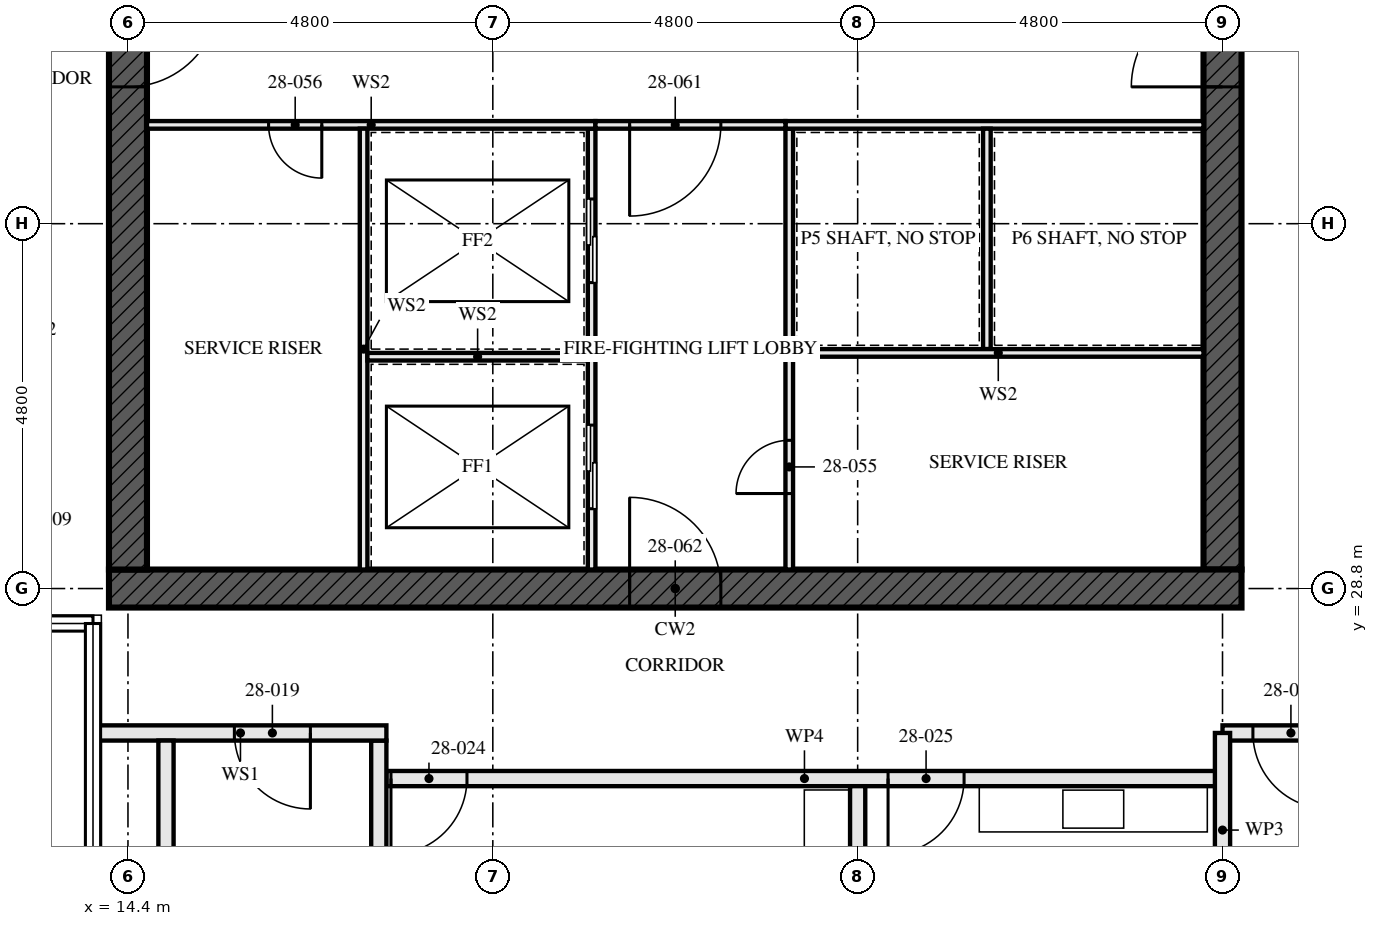
"""IFC4 building model, lengths in metres.
Left out: names, types, materials, properties, quantities, classifications, styles, units other than length and angle.
Written with IfcOpenShell. Run it as: python <this file> out.ifc"""

import sys

from ifc_helpers import new_model, si_unit, direction, frame, frame_2d, origin, place, context, subcontext, project, spatial, rectangle, extrude, element, fill, save


model = new_model("IFC4")
c1 = context("Model", 3, precision=1e-05, world=origin(), true_north=direction((0.0, 1.0)))
c2 = subcontext(c1, "Body", "Model", "MODEL_VIEW")
j1 = project(units=[si_unit("LENGTHUNIT", "METRE"), si_unit("PLANEANGLEUNIT", "RADIAN")], contexts=[c1])
p1 = place(None, origin())
s1 = spatial("IfcSite", under=j1, at=p1, CompositionType="ELEMENT")
p2 = place(p1, origin())
s2 = spatial("IfcBuilding", under=s1, at=p2, CompositionType="ELEMENT")
p3 = place(p2, frame((0.0, 0.0, 105.0)))
s3 = spatial("IfcBuildingStorey", under=s2, at=p3, CompositionType="ELEMENT", Elevation=105.0)
p4 = place(p3, frame((14.15, 28.8, -0.17), z_axis=(0.0, 0.0, 1.0), x_axis=(1.0, 0.0, 0.0)))
e1 = element("IfcWall", 1, at=p4, inside=s3, PredefinedType="SHEAR", context=c2, shape_type="SweptSolid", body=[
    extrude(rectangle(XDim=14.9, YDim=0.5, at=frame_2d((7.45, 0.0))), origin(), (0.0, 0.0, 1.0), 3.5),
])
p5 = place(p4, frame((6.85, 0.0, 0.17)))
e2 = element("IfcOpeningElement", 2, at=p5, cuts=e1, PredefinedType="OPENING", context=c2, shape_type="SweptSolid", body=[
    extrude(rectangle(XDim=1.2, YDim=2.1, at=frame_2d((0.6, 1.05))), frame((0.0, 0.26, 0.0), z_axis=(0.0, -1.0, 0.0), x_axis=(1.0, 0.0, 0.0)), (0.0, 0.0, 1.0), 0.521),
])
p6 = place(p3, frame((14.4, 42.95, -0.17), z_axis=(0.0, 0.0, 1.0), x_axis=(0.0, -1.0, 0.0)))
e3 = element("IfcWall", 3, at=p6, inside=s3, PredefinedType="SHEAR", context=c2, shape_type="SweptSolid", body=[
    extrude(rectangle(XDim=13.9, YDim=0.5, at=frame_2d((6.95, 0.0))), origin(), (0.0, 0.0, 1.0), 3.5),
])
p7 = place(p6, frame((6.35, 0.0, 0.17)))
e4 = element("IfcOpeningElement", 4, at=p7, cuts=e3, PredefinedType="OPENING", context=c2, shape_type="SweptSolid", body=[
    extrude(rectangle(XDim=1.2, YDim=2.1, at=frame_2d((0.6, 1.05))), frame((0.0, 0.26, 0.0), z_axis=(0.0, -1.0, 0.0), x_axis=(1.0, 0.0, 0.0)), (0.0, 0.0, 1.0), 0.521),
])
p8 = place(p3, frame((28.8, 29.05, -0.17), z_axis=(0.0, 0.0, 1.0), x_axis=(0.0, 1.0, 0.0)))
e5 = element("IfcWall", 5, at=p8, inside=s3, PredefinedType="SHEAR", context=c2, shape_type="SweptSolid", body=[
    extrude(rectangle(XDim=13.9, YDim=0.5, at=frame_2d((6.95, 0.0))), origin(), (0.0, 0.0, 1.0), 3.5),
])
p9 = place(p8, frame((6.35, 0.0, 0.17)))
e6 = element("IfcOpeningElement", 6, at=p9, cuts=e5, PredefinedType="OPENING", context=c2, shape_type="SweptSolid", body=[
    extrude(rectangle(XDim=1.2, YDim=2.1, at=frame_2d((0.6, 1.05))), frame((0.0, 0.26, 0.0), z_axis=(0.0, -1.0, 0.0), x_axis=(1.0, 0.0, 0.0)), (0.0, 0.0, 1.0), 0.521),
])
for number, where, z_axis, x_axis in (
    (7, (14.9, 22.1, 0.0), (0.0, 0.0, 1.0), (0.0, 1.0, 0.0)),
    (8, (17.7, 22.1, 0.0), (0.0, 0.0, 1.0), (0.0, 1.0, 0.0)),
):
    element("IfcWall", number, at=place(p3, frame(where, z_axis=z_axis, x_axis=x_axis)), inside=s3, PredefinedType="SOLIDWALL", context=c2, shape_type="SweptSolid", body=[
        extrude(rectangle(XDim=4.7, YDim=0.2, at=frame_2d((2.35, 0.0))), origin(), (0.0, 0.0, 1.0), 2.99),
    ])
p10 = place(p3, frame((13.96, 26.9, 0.0), z_axis=(0.0, 0.0, 1.0), x_axis=(1.0, 0.0, 0.0)))
e9 = element("IfcWall", 9, at=p10, inside=s3, PredefinedType="SOLIDWALL", context=c2, shape_type="SweptSolid", body=[
    extrude(rectangle(XDim=3.84, YDim=0.2, at=frame_2d((1.92, 0.0))), origin(), (0.0, 0.0, 1.0), 2.32),
])
p11 = place(p10, frame((1.84, 0.0, 0.0)))
e10 = element("IfcOpeningElement", 10, at=p11, cuts=e9, PredefinedType="OPENING", context=c2, shape_type="SweptSolid", body=[
    extrude(rectangle(XDim=1.0, YDim=2.1, at=frame_2d((0.5, 1.05))), frame((0.0, 0.111, 0.0), z_axis=(0.0, -1.0, 0.0), x_axis=(1.0, 0.0, 0.0)), (0.0, 0.0, 1.0), 0.221),
])
p12 = place(p3, frame((24.0, 14.745, 0.0), z_axis=(0.0, 0.0, 1.0), x_axis=(0.0, 1.0, 0.0)))
e11 = element("IfcWall", 11, at=p12, inside=s3, PredefinedType="PARTITIONING", context=c2, shape_type="SweptSolid", body=[
    extrude(rectangle(XDim=11.455, YDim=0.2, at=frame_2d((5.728, 0.0))), origin(), (0.0, 0.0, 1.0), 2.55),
])
p13 = place(p3, frame((17.8, 26.3, 0.0), z_axis=(0.0, 0.0, 1.0), x_axis=(1.0, 0.0, 0.0)))
e12 = element("IfcWall", 12, at=p13, inside=s3, PredefinedType="PARTITIONING", context=c2, shape_type="SweptSolid", body=[
    extrude(rectangle(XDim=11.0, YDim=0.2, at=frame_2d((5.5, 0.0))), origin(), (0.0, 0.0, 1.0), 2.55),
])
p14 = place(p13, frame((0.06, 0.0, 0.0)))
e13 = element("IfcOpeningElement", 13, at=p14, cuts=e12, PredefinedType="OPENING", context=c2, shape_type="SweptSolid", body=[
    extrude(rectangle(XDim=1.0, YDim=2.1, at=frame_2d((0.5, 1.05))), frame((0.0, 0.111, 0.0), z_axis=(0.0, -1.0, 0.0), x_axis=(1.0, 0.0, 0.0)), (0.0, 0.0, 1.0), 0.221),
])
p15 = place(p13, frame((6.6, 0.0, 0.0)))
e14 = element("IfcOpeningElement", 14, at=p15, cuts=e12, PredefinedType="OPENING", context=c2, shape_type="SweptSolid", body=[
    extrude(rectangle(XDim=1.0, YDim=2.1, at=frame_2d((0.5, 1.05))), frame((0.0, 0.111, 0.0), z_axis=(0.0, -1.0, 0.0), x_axis=(1.0, 0.0, 0.0)), (0.0, 0.0, 1.0), 0.221),
])
p16 = place(p3, frame((28.8, 26.9, 0.0), z_axis=(0.0, 0.0, 1.0), x_axis=(1.0, 0.0, 0.0)))
e15 = element("IfcWall", 15, at=p16, inside=s3, PredefinedType="PARTITIONING", context=c2, shape_type="SweptSolid", body=[
    extrude(rectangle(XDim=9.6, YDim=0.2, at=frame_2d((4.8, 0.0))), origin(), (0.0, 0.0, 1.0), 3.33),
])
p17 = place(p16, frame((0.4, 0.0, 0.0)))
e16 = element("IfcOpeningElement", 16, at=p17, cuts=e15, PredefinedType="OPENING", context=c2, shape_type="SweptSolid", body=[
    extrude(rectangle(XDim=1.0, YDim=2.1, at=frame_2d((0.5, 1.05))), frame((0.0, 0.111, 0.0), z_axis=(0.0, -1.0, 0.0), x_axis=(1.0, 0.0, 0.0)), (0.0, 0.0, 1.0), 0.221),
])
p18 = place(p16, frame((5.2, 0.0, 0.0)))
e17 = element("IfcOpeningElement", 17, at=p18, cuts=e15, PredefinedType="OPENING", context=c2, shape_type="SweptSolid", body=[
    extrude(rectangle(XDim=1.0, YDim=2.1, at=frame_2d((0.5, 1.05))), frame((0.0, 0.111, 0.0), z_axis=(0.0, -1.0, 0.0), x_axis=(1.0, 0.0, 0.0)), (0.0, 0.0, 1.0), 0.221),
])
p19 = place(p3, frame((20.5, 29.05, 0.0), z_axis=(0.0, 0.0, 1.0), x_axis=(0.0, 1.0, 0.0)))
e18 = element("IfcWall", 18, at=p19, inside=s3, PredefinedType="SOLIDWALL", context=c2, shape_type="SweptSolid", body=[
    extrude(rectangle(XDim=5.8, YDim=0.1, at=frame_2d((2.9, 0.0))), origin(), (0.0, 0.0, 1.0), 3.33),
])
p20 = place(p19, frame((0.8, 0.0, 0.0)))
e19 = element("IfcOpeningElement", 19, at=p20, cuts=e18, PredefinedType="OPENING", context=c2, shape_type="SweptSolid", body=[
    extrude(rectangle(XDim=1.1, YDim=2.3, at=frame_2d((0.55, 1.15))), frame((0.0, 0.061, 0.0), z_axis=(0.0, -1.0, 0.0), x_axis=(1.0, 0.0, 0.0)), (0.0, 0.0, 1.0), 0.121),
])
p21 = place(p19, frame((3.775, 0.0, 0.0)))
e20 = element("IfcOpeningElement", 20, at=p21, cuts=e18, PredefinedType="OPENING", context=c2, shape_type="SweptSolid", body=[
    extrude(rectangle(XDim=1.1, YDim=2.3, at=frame_2d((0.55, 1.15))), frame((0.0, 0.061, 0.0), z_axis=(0.0, -1.0, 0.0), x_axis=(1.0, 0.0, 0.0)), (0.0, 0.0, 1.0), 0.121),
])
p22 = place(p3, frame((23.1, 29.05, 0.0), z_axis=(0.0, 0.0, 1.0), x_axis=(0.0, 1.0, 0.0)))
e21 = element("IfcWall", 21, at=p22, inside=s3, PredefinedType="SOLIDWALL", context=c2, shape_type="SweptSolid", body=[
    extrude(rectangle(XDim=5.8, YDim=0.1, at=frame_2d((2.9, 0.0))), origin(), (0.0, 0.0, 1.0), 3.33),
])
p23 = place(p22, frame((1.0, 0.0, 0.0)))
e22 = element("IfcOpeningElement", 22, at=p23, cuts=e21, PredefinedType="OPENING", context=c2, shape_type="SweptSolid", body=[
    extrude(rectangle(XDim=0.7, YDim=2.1, at=frame_2d((0.35, 1.05))), frame((0.0, 0.061, 0.0), z_axis=(0.0, -1.0, 0.0), x_axis=(1.0, 0.0, 0.0)), (0.0, 0.0, 1.0), 0.121),
])
p24 = place(p3, frame((14.65, 34.9, 0.0), z_axis=(0.0, 0.0, 1.0), x_axis=(1.0, 0.0, 0.0)))
e23 = element("IfcWall", 23, at=p24, inside=s3, PredefinedType="SOLIDWALL", context=c2, shape_type="SweptSolid", body=[
    extrude(rectangle(XDim=5.9, YDim=0.1, at=frame_2d((2.95, 0.0))), origin(), (0.0, 0.0, 1.0), 3.33),
])
p25 = place(p24, frame((1.6, 0.0, 0.0)))
e24 = element("IfcOpeningElement", 24, at=p25, cuts=e23, PredefinedType="OPENING", context=c2, shape_type="SweptSolid", body=[
    extrude(rectangle(XDim=0.7, YDim=2.1, at=frame_2d((0.35, 1.05))), frame((0.0, 0.061, 0.0), z_axis=(0.0, -1.0, 0.0), x_axis=(1.0, 0.0, 0.0)), (0.0, 0.0, 1.0), 0.121),
])
p26 = place(p3, frame((23.05, 34.9, 0.0), z_axis=(0.0, 0.0, 1.0), x_axis=(1.0, 0.0, 0.0)))
e25 = element("IfcWall", 25, at=p26, inside=s3, PredefinedType="SOLIDWALL", context=c2, shape_type="SweptSolid", body=[
    extrude(rectangle(XDim=5.5, YDim=0.1, at=frame_2d((2.75, 0.0))), origin(), (0.0, 0.0, 1.0), 3.33),
])
p27 = place(p3, frame((20.55, 34.9, 0.0), z_axis=(0.0, 0.0, 1.0), x_axis=(1.0, 0.0, 0.0)))
e26 = element("IfcWall", 26, at=p27, inside=s3, PredefinedType="SOLIDWALL", context=c2, shape_type="SweptSolid", body=[
    extrude(rectangle(XDim=2.5, YDim=0.1, at=frame_2d((1.25, 0.0))), origin(), (0.0, 0.0, 1.0), 3.33),
])
p28 = place(p27, frame((0.45, 0.0, 0.0)))
e27 = element("IfcOpeningElement", 27, at=p28, cuts=e26, PredefinedType="OPENING", context=c2, shape_type="SweptSolid", body=[
    extrude(rectangle(XDim=1.2, YDim=2.1, at=frame_2d((0.6, 1.05))), frame((0.0, 0.061, 0.0), z_axis=(0.0, -1.0, 0.0), x_axis=(1.0, 0.0, 0.0)), (0.0, 0.0, 1.0), 0.121),
])
p29 = place(p3, frame((17.5, 29.05, 0.0), z_axis=(0.0, 0.0, 1.0), x_axis=(0.0, 1.0, 0.0)))
e28 = element("IfcWall", 28, at=p29, inside=s3, PredefinedType="SOLIDWALL", context=c2, shape_type="SweptSolid", body=[
    extrude(rectangle(XDim=5.8, YDim=0.1, at=frame_2d((2.9, 0.0))), origin(), (0.0, 0.0, 1.0), 3.33),
])
p30 = place(p3, frame((17.55, 31.85, 0.0), z_axis=(0.0, 0.0, 1.0), x_axis=(1.0, 0.0, 0.0)))
e29 = element("IfcWall", 29, at=p30, inside=s3, PredefinedType="SOLIDWALL", context=c2, shape_type="SweptSolid", body=[
    extrude(rectangle(XDim=2.9, YDim=0.1, at=frame_2d((1.45, 0.0))), origin(), (0.0, 0.0, 1.0), 3.33),
])
p31 = place(p3, frame((25.7, 31.95, 0.0), z_axis=(0.0, 0.0, 1.0), x_axis=(0.0, 1.0, 0.0)))
e30 = element("IfcWall", 30, at=p31, inside=s3, PredefinedType="SOLIDWALL", context=c2, shape_type="SweptSolid", body=[
    extrude(rectangle(XDim=2.9, YDim=0.1, at=frame_2d((1.45, 0.0))), origin(), (0.0, 0.0, 1.0), 3.33),
])
p32 = place(p3, frame((23.15, 31.9, 0.0), z_axis=(0.0, 0.0, 1.0), x_axis=(1.0, 0.0, 0.0)))
e31 = element("IfcWall", 31, at=p32, inside=s3, PredefinedType="SOLIDWALL", context=c2, shape_type="SweptSolid", body=[
    extrude(rectangle(XDim=5.4, YDim=0.1, at=frame_2d((2.7, 0.0))), origin(), (0.0, 0.0, 1.0), 3.33),
])
p33 = place(p3, frame((28.8, 24.345, 0.0), z_axis=(0.0, 0.0, 1.0), x_axis=(0.0, 1.0, 0.0)))
e32 = element("IfcWall", 32, at=p33, inside=s3, PredefinedType="PARTITIONING", context=c2, shape_type="SweptSolid", body=[
    extrude(rectangle(XDim=2.555, YDim=0.2, at=frame_2d((1.277, 0.0))), origin(), (0.0, 0.0, 1.0), 2.32),
])
p34 = place(p11, frame((1.0, 0.0, 0.0), z_axis=(0.0, 0.0, 1.0), x_axis=(-1.0, 0.0, 0.0)))
e33 = element("IfcDoor", 33, at=p34, inside=s3, OperationType="SINGLE_SWING_RIGHT", PredefinedType="DOOR", context=c2, shape_type="SweptSolid", body=[
    extrude(rectangle(XDim=1.0, YDim=2.1, at=frame_2d((0.5, 1.05))), frame((0.0, 0.032, 0.0), z_axis=(0.0, -1.0, 0.0), x_axis=(1.0, 0.0, 0.0)), (0.0, 0.0, 1.0), 0.064),
])
fill(e10, e33)
p35 = place(p14, frame((1.0, 0.0, 0.0), z_axis=(0.0, 0.0, 1.0), x_axis=(-1.0, 0.0, 0.0)))
e34 = element("IfcDoor", 34, at=p35, inside=s3, OperationType="SINGLE_SWING_LEFT", PredefinedType="DOOR", context=c2, shape_type="SweptSolid", body=[
    extrude(rectangle(XDim=1.0, YDim=2.1, at=frame_2d((0.5, 1.05))), frame((0.0, 0.027, 0.0), z_axis=(0.0, -1.0, 0.0), x_axis=(1.0, 0.0, 0.0)), (0.0, 0.0, 1.0), 0.054),
])
fill(e13, e34)
p36 = place(p15, frame((1.0, 0.0, 0.0), z_axis=(0.0, 0.0, 1.0), x_axis=(-1.0, 0.0, 0.0)))
e35 = element("IfcDoor", 35, at=p36, inside=s3, OperationType="SINGLE_SWING_LEFT", PredefinedType="DOOR", context=c2, shape_type="SweptSolid", body=[
    extrude(rectangle(XDim=1.0, YDim=2.1, at=frame_2d((0.5, 1.05))), frame((0.0, 0.027, 0.0), z_axis=(0.0, -1.0, 0.0), x_axis=(1.0, 0.0, 0.0)), (0.0, 0.0, 1.0), 0.054),
])
fill(e14, e35)
p37 = place(p17, frame((1.0, 0.0, 0.0), z_axis=(0.0, 0.0, 1.0), x_axis=(-1.0, 0.0, 0.0)))
e36 = element("IfcDoor", 36, at=p37, inside=s3, OperationType="SINGLE_SWING_RIGHT", PredefinedType="DOOR", context=c2, shape_type="SweptSolid", body=[
    extrude(rectangle(XDim=1.0, YDim=2.1, at=frame_2d((0.5, 1.05))), frame((0.0, 0.027, 0.0), z_axis=(0.0, -1.0, 0.0), x_axis=(1.0, 0.0, 0.0)), (0.0, 0.0, 1.0), 0.054),
])
fill(e16, e36)
p38 = place(p20, origin())
e37 = element("IfcDoor", 37, at=p38, inside=s3, OperationType="SLIDING_TO_LEFT", PredefinedType="DOOR", context=c2, shape_type="SweptSolid", body=[
    extrude(rectangle(XDim=1.1, YDim=2.3, at=frame_2d((0.55, 1.15))), frame((0.0, 0.05, 0.0), z_axis=(0.0, -1.0, 0.0), x_axis=(1.0, 0.0, 0.0)), (0.0, 0.0, 1.0), 0.1),
])
fill(e19, e37)
p39 = place(p21, origin())
e38 = element("IfcDoor", 38, at=p39, inside=s3, OperationType="SLIDING_TO_LEFT", PredefinedType="DOOR", context=c2, shape_type="SweptSolid", body=[
    extrude(rectangle(XDim=1.1, YDim=2.3, at=frame_2d((0.55, 1.15))), frame((0.0, 0.05, 0.0), z_axis=(0.0, -1.0, 0.0), x_axis=(1.0, 0.0, 0.0)), (0.0, 0.0, 1.0), 0.1),
])
fill(e20, e38)
p40 = place(p23, origin())
e39 = element("IfcDoor", 39, at=p40, inside=s3, OperationType="SINGLE_SWING_RIGHT", PredefinedType="DOOR", context=c2, shape_type="SweptSolid", body=[
    extrude(rectangle(XDim=0.7, YDim=2.1, at=frame_2d((0.35, 1.05))), frame((0.0, 0.027, 0.0), z_axis=(0.0, -1.0, 0.0), x_axis=(1.0, 0.0, 0.0)), (0.0, 0.0, 1.0), 0.054),
])
fill(e22, e39)
p41 = place(p25, frame((0.7, 0.0, 0.0), z_axis=(0.0, 0.0, 1.0), x_axis=(-1.0, 0.0, 0.0)))
e40 = element("IfcDoor", 40, at=p41, inside=s3, OperationType="SINGLE_SWING_RIGHT", PredefinedType="DOOR", context=c2, shape_type="SweptSolid", body=[
    extrude(rectangle(XDim=0.7, YDim=2.1, at=frame_2d((0.35, 1.05))), frame((0.0, 0.027, 0.0), z_axis=(0.0, -1.0, 0.0), x_axis=(1.0, 0.0, 0.0)), (0.0, 0.0, 1.0), 0.054),
])
fill(e24, e40)
p42 = place(p28, frame((1.2, 0.0, 0.0), z_axis=(0.0, 0.0, 1.0), x_axis=(-1.0, 0.0, 0.0)))
e41 = element("IfcDoor", 41, at=p42, inside=s3, OperationType="SINGLE_SWING_LEFT", PredefinedType="DOOR", context=c2, shape_type="SweptSolid", body=[
    extrude(rectangle(XDim=1.2, YDim=2.1, at=frame_2d((0.6, 1.05))), frame((0.0, 0.027, 0.0), z_axis=(0.0, -1.0, 0.0), x_axis=(1.0, 0.0, 0.0)), (0.0, 0.0, 1.0), 0.054),
])
fill(e27, e41)
p43 = place(p5, origin())
e42 = element("IfcDoor", 42, at=p43, inside=s3, OperationType="SINGLE_SWING_LEFT", PredefinedType="DOOR", context=c2, shape_type="SweptSolid", body=[
    extrude(rectangle(XDim=1.2, YDim=2.1, at=frame_2d((0.6, 1.05))), frame((0.0, 0.027, 0.0), z_axis=(0.0, -1.0, 0.0), x_axis=(1.0, 0.0, 0.0)), (0.0, 0.0, 1.0), 0.054),
])
fill(e2, e42)
p44 = place(p7, origin())
e43 = element("IfcDoor", 43, at=p44, inside=s3, OperationType="SINGLE_SWING_LEFT", PredefinedType="DOOR", context=c2, shape_type="SweptSolid", body=[
    extrude(rectangle(XDim=1.2, YDim=2.1, at=frame_2d((0.6, 1.05))), frame((0.0, 0.027, 0.0), z_axis=(0.0, -1.0, 0.0), x_axis=(1.0, 0.0, 0.0)), (0.0, 0.0, 1.0), 0.054),
])
fill(e4, e43)
p45 = place(p9, origin())
e44 = element("IfcDoor", 44, at=p45, inside=s3, OperationType="SINGLE_SWING_LEFT", PredefinedType="DOOR", context=c2, shape_type="SweptSolid", body=[
    extrude(rectangle(XDim=1.2, YDim=2.1, at=frame_2d((0.6, 1.05))), frame((0.0, 0.027, 0.0), z_axis=(0.0, -1.0, 0.0), x_axis=(1.0, 0.0, 0.0)), (0.0, 0.0, 1.0), 0.054),
])
fill(e6, e44)
save(model, sys.argv[1])
